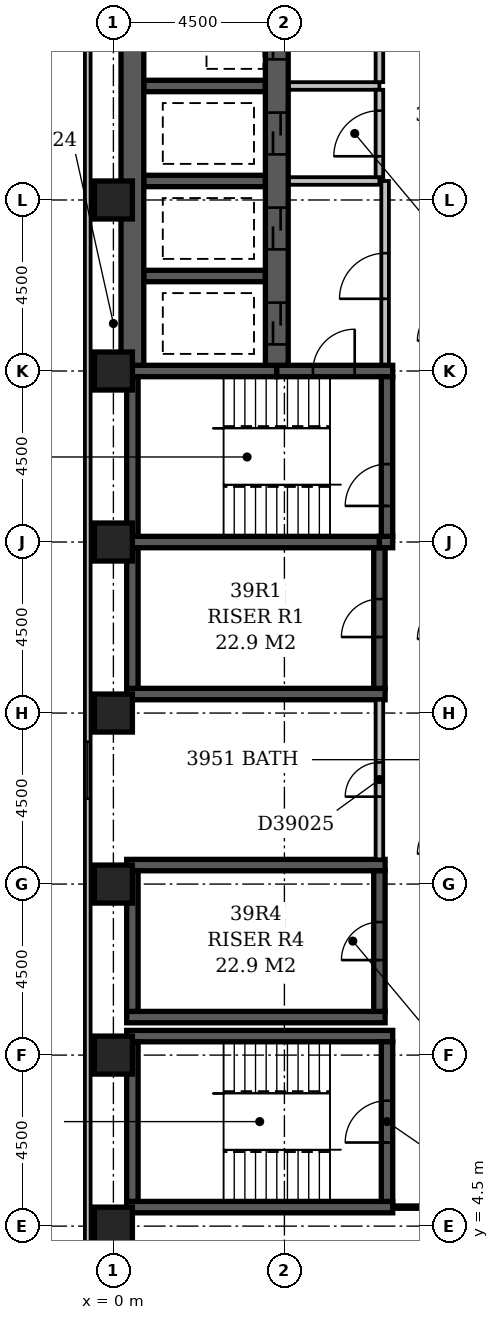
"""IFC4 building model, lengths in metres.
Left out: names, types, materials, properties, quantities, classifications, styles, units other than length and angle.
Written with IfcOpenShell. Run it as: python <this file> out.ifc"""

import sys

from ifc_helpers import new_model, si_unit, direction, frame, frame_2d, origin, origin_2d, place, context, subcontext, project, spatial, rectangle, extrude, element, fill, save


model = new_model("IFC4")
c1 = context("Model", 3, precision=1e-05, world=origin(), true_north=direction((0.0, 1.0)))
c2 = subcontext(c1, "Body", "Model", "MODEL_VIEW")
j1 = project(units=[si_unit("LENGTHUNIT", "METRE"), si_unit("PLANEANGLEUNIT", "RADIAN")], contexts=[c1])
p1 = place(None, origin())
s1 = spatial("IfcSite", under=j1, at=p1, CompositionType="ELEMENT")
p2 = place(p1, origin())
s2 = spatial("IfcBuilding", under=s1, at=p2, CompositionType="ELEMENT")
p3 = place(p2, frame((0.0, 0.0, 155.6)))
s3 = spatial("IfcBuildingStorey", under=s2, at=p3, CompositionType="ELEMENT", Elevation=155.6)
for number, where, z_axis, x_axis in (
    (1, (0.35, 5.0, -0.3), (0.0, 0.0, 1.0), (1.0, 0.0, 0.0)),
    (2, (0.35, 9.5, -0.3), (0.0, 0.0, 1.0), (1.0, 0.0, 0.0)),
):
    element("IfcWall", number, at=place(p3, frame(where, z_axis=z_axis, x_axis=x_axis)), inside=s3, PredefinedType="SHEAR", context=c2, shape_type="SweptSolid", body=[
        extrude(rectangle(XDim=7.0, YDim=0.3, at=frame_2d((3.5, 0.0))), origin(), (0.0, 0.0, 1.0), 3.6),
    ])
for number, where, z_axis, x_axis in (
    (3, (0.35, 10.0, -0.3), (0.0, 0.0, 1.0), (1.0, 0.0, 0.0)),
    (4, (0.35, 14.0, -0.3), (0.0, 0.0, 1.0), (1.0, 0.0, 0.0)),
    (5, (0.35, 18.5, -0.3), (0.0, 0.0, 1.0), (1.0, 0.0, 0.0)),
):
    element("IfcWall", number, at=place(p3, frame(where, z_axis=z_axis, x_axis=x_axis)), inside=s3, PredefinedType="SHEAR", context=c2, shape_type="SweptSolid", body=[
        extrude(rectangle(XDim=6.8, YDim=0.3, at=frame_2d((3.4, 0.0))), origin(), (0.0, 0.0, 1.0), 3.6),
    ])
p4 = place(p3, frame((0.35, 22.5, -0.3), z_axis=(0.0, 0.0, 1.0), x_axis=(1.0, 0.0, 0.0)))
e6 = element("IfcWall", 6, at=p4, inside=s3, PredefinedType="SHEAR", context=c2, shape_type="SweptSolid", body=[
    extrude(rectangle(XDim=6.65, YDim=0.3, at=frame_2d((3.325, 0.0))), origin(), (0.0, 0.0, 1.0), 3.6),
])
p5 = place(p3, frame((0.35, 27.0, -0.3), z_axis=(0.0, 0.0, 1.0), x_axis=(1.0, 0.0, 0.0)))
e7 = element("IfcWall", 7, at=p5, inside=s3, PredefinedType="SHEAR", context=c2, shape_type="SweptSolid", body=[
    extrude(rectangle(XDim=3.95, YDim=0.3, at=frame_2d((1.975, 0.0))), origin(), (0.0, 0.0, 1.0), 3.6),
])
p6 = place(p3, frame((0.5, 5.15, -0.3), z_axis=(0.0, 0.0, 1.0), x_axis=(0.0, 1.0, 0.0)))
e8 = element("IfcWall", 8, at=p6, inside=s3, PredefinedType="SHEAR", context=c2, shape_type="SweptSolid", body=[
    extrude(rectangle(XDim=4.2, YDim=0.3, at=frame_2d((2.1, 0.0))), origin(), (0.0, 0.0, 1.0), 3.6),
])
for number, where, z_axis, x_axis in (
    (9, (0.5, 10.15, -0.3), (0.0, 0.0, 1.0), (0.0, 1.0, 0.0)),
    (10, (0.5, 18.65, -0.3), (0.0, 0.0, 1.0), (0.0, 1.0, 0.0)),
):
    element("IfcWall", number, at=place(p3, frame(where, z_axis=z_axis, x_axis=x_axis)), inside=s3, PredefinedType="SHEAR", context=c2, shape_type="SweptSolid", body=[
        extrude(rectangle(XDim=3.7, YDim=0.3, at=frame_2d((1.85, 0.0))), origin(), (0.0, 0.0, 1.0), 3.6),
    ])
p7 = place(p3, frame((0.5, 22.65, -0.3), z_axis=(0.0, 0.0, 1.0), x_axis=(0.0, 1.0, 0.0)))
e11 = element("IfcWall", 11, at=p7, inside=s3, PredefinedType="SHEAR", context=c2, shape_type="SweptSolid", body=[
    extrude(rectangle(XDim=4.2, YDim=0.3, at=frame_2d((2.1, 0.0))), origin(), (0.0, 0.0, 1.0), 3.6),
])
p8 = place(p3, frame((0.5, 27.15, -0.3), z_axis=(0.0, 0.0, 1.0), x_axis=(0.0, 1.0, 0.0)))
e12 = element("IfcWall", 12, at=p8, inside=s3, PredefinedType="SHEAR", context=c2, shape_type="SweptSolid", body=[
    extrude(rectangle(XDim=22.05, YDim=0.6, at=frame_2d((11.025, 0.0))), origin(), (0.0, 0.0, 1.0), 3.6),
])
for number, where, z_axis, x_axis in (
    (13, (0.8, 29.5, -0.3), (0.0, 0.0, 1.0), (1.0, 0.0, 0.0)),
    (14, (0.8, 32.0, -0.3), (0.0, 0.0, 1.0), (1.0, 0.0, 0.0)),
    (15, (0.8, 34.5, -0.3), (0.0, 0.0, 1.0), (1.0, 0.0, 0.0)),
):
    element("IfcWall", number, at=place(p3, frame(where, z_axis=z_axis, x_axis=x_axis)), inside=s3, PredefinedType="SHEAR", context=c2, shape_type="SweptSolid", body=[
        extrude(rectangle(XDim=3.2, YDim=0.3, at=frame_2d((1.6, 0.0))), origin(), (0.0, 0.0, 1.0), 3.6),
    ])
p9 = place(p3, frame((4.3, 27.0, -0.3), z_axis=(0.0, 0.0, 1.0), x_axis=(1.0, 0.0, 0.0)))
e16 = element("IfcWall", 16, at=p9, inside=s3, PredefinedType="SHEAR", context=c2, shape_type="SweptSolid", body=[
    extrude(rectangle(XDim=3.05, YDim=0.3, at=frame_2d((1.525, 0.0))), origin(), (0.0, 0.0, 1.0), 3.6),
])
p10 = place(p9, frame((0.95, 0.0, 0.3)))
e17 = element("IfcOpeningElement", 17, at=p10, cuts=e16, PredefinedType="OPENING", context=c2, shape_type="SweptSolid", body=[
    extrude(rectangle(XDim=1.1, YDim=2.1, at=frame_2d((0.55, 1.05))), frame((0.0, 0.162, 0.0), z_axis=(0.0, -1.0, 0.0), x_axis=(1.0, 0.0, 0.0)), (0.0, 0.0, 1.0), 0.324),
])
p11 = place(p3, frame((4.3, 27.15, -0.3), z_axis=(0.0, 0.0, 1.0), x_axis=(0.0, 1.0, 0.0)))
e18 = element("IfcWall", 18, at=p11, inside=s3, PredefinedType="SHEAR", context=c2, shape_type="SweptSolid", body=[
    extrude(rectangle(XDim=22.05, YDim=0.6, at=frame_2d((11.025, 0.0))), origin(), (0.0, 0.0, 1.0), 3.6),
])
p12 = place(p11, frame((3.05, 0.0, 0.3)))
e19 = element("IfcOpeningElement", 19, at=p12, cuts=e18, PredefinedType="OPENING", context=c2, shape_type="SweptSolid", body=[
    extrude(rectangle(XDim=1.1, YDim=2.1, at=frame_2d((0.55, 1.05))), frame((0.0, 0.312, 0.0), z_axis=(0.0, -1.0, 0.0), x_axis=(1.0, 0.0, 0.0)), (0.0, 0.0, 1.0), 0.624),
])
p13 = place(p11, frame((0.55, 0.0, 0.3)))
e20 = element("IfcOpeningElement", 20, at=p13, cuts=e18, PredefinedType="OPENING", context=c2, shape_type="SweptSolid", body=[
    extrude(rectangle(XDim=1.1, YDim=2.1, at=frame_2d((0.55, 1.05))), frame((0.0, 0.312, 0.0), z_axis=(0.0, -1.0, 0.0), x_axis=(1.0, 0.0, 0.0)), (0.0, 0.0, 1.0), 0.624),
])
p14 = place(p11, frame((20.55, 0.0, 0.3)))
e21 = element("IfcOpeningElement", 21, at=p14, cuts=e18, PredefinedType="OPENING", context=c2, shape_type="SweptSolid", body=[
    extrude(rectangle(XDim=1.1, YDim=2.1, at=frame_2d((0.55, 1.05))), frame((0.0, 0.312, 0.0), z_axis=(0.0, -1.0, 0.0), x_axis=(1.0, 0.0, 0.0)), (0.0, 0.0, 1.0), 0.624),
])
p15 = place(p11, frame((18.05, 0.0, 0.3)))
e22 = element("IfcOpeningElement", 22, at=p15, cuts=e18, PredefinedType="OPENING", context=c2, shape_type="SweptSolid", body=[
    extrude(rectangle(XDim=1.1, YDim=2.1, at=frame_2d((0.55, 1.05))), frame((0.0, 0.312, 0.0), z_axis=(0.0, -1.0, 0.0), x_axis=(1.0, 0.0, 0.0)), (0.0, 0.0, 1.0), 0.624),
])
p16 = place(p11, frame((15.55, 0.0, 0.3)))
e23 = element("IfcOpeningElement", 23, at=p16, cuts=e18, PredefinedType="OPENING", context=c2, shape_type="SweptSolid", body=[
    extrude(rectangle(XDim=1.1, YDim=2.1, at=frame_2d((0.55, 1.05))), frame((0.0, 0.312, 0.0), z_axis=(0.0, -1.0, 0.0), x_axis=(1.0, 0.0, 0.0)), (0.0, 0.0, 1.0), 0.624),
])
p17 = place(p11, frame((13.05, 0.0, 0.3)))
e24 = element("IfcOpeningElement", 24, at=p17, cuts=e18, PredefinedType="OPENING", context=c2, shape_type="SweptSolid", body=[
    extrude(rectangle(XDim=1.1, YDim=2.1, at=frame_2d((0.55, 1.05))), frame((0.0, 0.312, 0.0), z_axis=(0.0, -1.0, 0.0), x_axis=(1.0, 0.0, 0.0)), (0.0, 0.0, 1.0), 0.624),
])
p18 = place(p11, frame((10.55, 0.0, 0.3)))
e25 = element("IfcOpeningElement", 25, at=p18, cuts=e18, PredefinedType="OPENING", context=c2, shape_type="SweptSolid", body=[
    extrude(rectangle(XDim=1.1, YDim=2.1, at=frame_2d((0.55, 1.05))), frame((0.0, 0.312, 0.0), z_axis=(0.0, -1.0, 0.0), x_axis=(1.0, 0.0, 0.0)), (0.0, 0.0, 1.0), 0.624),
])
p19 = place(p11, frame((8.05, 0.0, 0.3)))
e26 = element("IfcOpeningElement", 26, at=p19, cuts=e18, PredefinedType="OPENING", context=c2, shape_type="SweptSolid", body=[
    extrude(rectangle(XDim=1.1, YDim=2.1, at=frame_2d((0.55, 1.05))), frame((0.0, 0.312, 0.0), z_axis=(0.0, -1.0, 0.0), x_axis=(1.0, 0.0, 0.0)), (0.0, 0.0, 1.0), 0.624),
])
p20 = place(p11, frame((5.55, 0.0, 0.3)))
e27 = element("IfcOpeningElement", 27, at=p20, cuts=e18, PredefinedType="OPENING", context=c2, shape_type="SweptSolid", body=[
    extrude(rectangle(XDim=1.1, YDim=2.1, at=frame_2d((0.55, 1.05))), frame((0.0, 0.312, 0.0), z_axis=(0.0, -1.0, 0.0), x_axis=(1.0, 0.0, 0.0)), (0.0, 0.0, 1.0), 0.624),
])
p21 = place(p3, frame((7.0, 10.15, -0.3), z_axis=(0.0, 0.0, 1.0), x_axis=(0.0, 1.0, 0.0)))
e28 = element("IfcWall", 28, at=p21, inside=s3, PredefinedType="SHEAR", context=c2, shape_type="SweptSolid", body=[
    extrude(rectangle(XDim=3.7, YDim=0.3, at=frame_2d((1.85, 0.0))), origin(), (0.0, 0.0, 1.0), 3.6),
])
p22 = place(p21, frame((1.35, 0.0, 0.3)))
e29 = element("IfcOpeningElement", 29, at=p22, cuts=e28, PredefinedType="OPENING", context=c2, shape_type="SweptSolid", body=[
    extrude(rectangle(XDim=1.0, YDim=2.1, at=frame_2d((0.5, 1.05))), frame((0.0, 0.162, 0.0), z_axis=(0.0, -1.0, 0.0), x_axis=(1.0, 0.0, 0.0)), (0.0, 0.0, 1.0), 0.324),
])
p23 = place(p3, frame((7.0, 18.65, -0.3), z_axis=(0.0, 0.0, 1.0), x_axis=(0.0, 1.0, 0.0)))
e30 = element("IfcWall", 30, at=p23, inside=s3, PredefinedType="SHEAR", context=c2, shape_type="SweptSolid", body=[
    extrude(rectangle(XDim=3.7, YDim=0.3, at=frame_2d((1.85, 0.0))), origin(), (0.0, 0.0, 1.0), 3.6),
])
p24 = place(p23, frame((1.35, 0.0, 0.3)))
e31 = element("IfcOpeningElement", 31, at=p24, cuts=e30, PredefinedType="OPENING", context=c2, shape_type="SweptSolid", body=[
    extrude(rectangle(XDim=1.0, YDim=2.1, at=frame_2d((0.5, 1.05))), frame((0.0, 0.162, 0.0), z_axis=(0.0, -1.0, 0.0), x_axis=(1.0, 0.0, 0.0)), (0.0, 0.0, 1.0), 0.324),
])
p25 = place(p3, frame((7.0, 22.5, -0.3), z_axis=(0.0, 0.0, 1.0), x_axis=(1.0, 0.0, 0.0)))
e32 = element("IfcWall", 32, at=p25, inside=s3, PredefinedType="SHEAR", context=c2, shape_type="SweptSolid", body=[
    extrude(rectangle(XDim=0.35, YDim=0.3, at=frame_2d((0.175, 0.0))), origin(), (0.0, 0.0, 1.0), 3.6),
])
p26 = place(p3, frame((7.2, 5.15, -0.3), z_axis=(0.0, 0.0, 1.0), x_axis=(0.0, 1.0, 0.0)))
e33 = element("IfcWall", 33, at=p26, inside=s3, PredefinedType="SHEAR", context=c2, shape_type="SweptSolid", body=[
    extrude(rectangle(XDim=4.2, YDim=0.3, at=frame_2d((2.1, 0.0))), origin(), (0.0, 0.0, 1.0), 3.6),
])
p27 = place(p26, frame((1.55, 0.0, 0.3)))
e34 = element("IfcOpeningElement", 34, at=p27, cuts=e33, PredefinedType="OPENING", context=c2, shape_type="SweptSolid", body=[
    extrude(rectangle(XDim=1.1, YDim=2.1, at=frame_2d((0.55, 1.05))), frame((0.0, 0.162, 0.0), z_axis=(0.0, -1.0, 0.0), x_axis=(1.0, 0.0, 0.0)), (0.0, 0.0, 1.0), 0.324),
])
p28 = place(p3, frame((7.2, 22.65, -0.3), z_axis=(0.0, 0.0, 1.0), x_axis=(0.0, 1.0, 0.0)))
e35 = element("IfcWall", 35, at=p28, inside=s3, PredefinedType="SHEAR", context=c2, shape_type="SweptSolid", body=[
    extrude(rectangle(XDim=4.2, YDim=0.3, at=frame_2d((2.1, 0.0))), origin(), (0.0, 0.0, 1.0), 3.6),
])
p29 = place(p28, frame((0.8, 0.0, 0.3)))
e36 = element("IfcOpeningElement", 36, at=p29, cuts=e35, PredefinedType="OPENING", context=c2, shape_type="SweptSolid", body=[
    extrude(rectangle(XDim=1.1, YDim=2.1, at=frame_2d((0.55, 1.05))), frame((0.0, 0.162, 0.0), z_axis=(0.0, -1.0, 0.0), x_axis=(1.0, 0.0, 0.0)), (0.0, 0.0, 1.0), 0.324),
])
for number, where, z_axis, x_axis in (
    (37, (0.0, 4.5, -0.3), (0.0, 0.0, 1.0), (1.0, 0.0, 0.0)),
    (38, (0.0, 9.0, -0.3), (0.0, 0.0, 1.0), (1.0, 0.0, 0.0)),
    (39, (0.0, 13.5, -0.3), (0.0, 0.0, 1.0), (1.0, 0.0, 0.0)),
    (40, (0.0, 18.0, -0.3), (0.0, 0.0, 1.0), (1.0, 0.0, 0.0)),
    (41, (0.0, 22.5, -0.3), (0.0, 0.0, 1.0), (1.0, 0.0, 0.0)),
    (42, (0.0, 27.0, -0.3), (0.0, 0.0, 1.0), (1.0, 0.0, 0.0)),
    (43, (0.0, 31.5, -0.3), (0.0, 0.0, 1.0), (1.0, 0.0, 0.0)),
):
    element("IfcColumn", number, at=place(p3, frame(where, z_axis=z_axis, x_axis=x_axis)), inside=s3, PredefinedType="COLUMN", context=c2, shape_type="SweptSolid", body=[
        extrude(rectangle(XDim=1.0, YDim=1.0, at=origin_2d()), origin(), (0.0, 0.0, 1.0), 3.6),
    ])
p30 = place(p3, frame((-0.675, 59.1, 0.0), z_axis=(0.0, 0.0, 1.0), x_axis=(0.0, -1.0, 0.0)))
e44 = element("IfcWall", 44, at=p30, inside=s3, PredefinedType="STANDARD", context=c2, shape_type="SweptSolid", body=[
    extrude(rectangle(XDim=55.35, YDim=0.15, at=frame_2d((27.675, 0.0))), origin(), (0.0, 0.0, 1.0), 2.7),
])
p31 = place(p30, frame((41.854, 0.0, 0.6)))
e45 = element("IfcOpeningElement", 45, at=p31, cuts=e44, PredefinedType="OPENING", context=c2, shape_type="SweptSolid", body=[
    extrude(rectangle(XDim=1.5, YDim=1.8, at=frame_2d((0.75, 0.9))), frame((0.0, 0.087, 0.0), z_axis=(0.0, -1.0, 0.0), x_axis=(1.0, 0.0, 0.0)), (0.0, 0.0, 1.0), 0.174),
])
p32 = place(p3, frame((4.62, 34.5, 0.0), z_axis=(0.0, 0.0, 1.0), x_axis=(1.0, 0.0, 0.0)))
e46 = element("IfcWall", 46, at=p32, inside=s3, PredefinedType="PARTITIONING", context=c2, shape_type="SweptSolid", body=[
    extrude(rectangle(XDim=2.38, YDim=0.2, at=frame_2d((1.19, 0.0))), origin(), (0.0, 0.0, 1.0), 3.3),
])
p33 = place(p3, frame((7.0, 34.6, 0.0), z_axis=(0.0, 0.0, 1.0), x_axis=(0.0, 1.0, 0.0)))
e47 = element("IfcWall", 47, at=p33, inside=s3, PredefinedType="PARTITIONING", context=c2, shape_type="SweptSolid", body=[
    extrude(rectangle(XDim=14.9, YDim=0.2, at=frame_2d((7.45, 0.0))), origin(), (0.0, 0.0, 1.0), 3.3),
])
p34 = place(p33, frame((2.8, 0.0, 0.0)))
e48 = element("IfcOpeningElement", 48, at=p34, cuts=e47, PredefinedType="OPENING", context=c2, shape_type="SweptSolid", body=[
    extrude(rectangle(XDim=1.2, YDim=2.1, at=frame_2d((0.6, 1.05))), frame((0.0, 0.112, 0.0), z_axis=(0.0, -1.0, 0.0), x_axis=(1.0, 0.0, 0.0)), (0.0, 0.0, 1.0), 0.224),
])
p35 = place(p33, frame((9.8, 0.0, 0.0)))
e49 = element("IfcOpeningElement", 49, at=p35, cuts=e47, PredefinedType="OPENING", context=c2, shape_type="SweptSolid", body=[
    extrude(rectangle(XDim=1.2, YDim=2.1, at=frame_2d((0.6, 1.05))), frame((0.0, 0.112, 0.0), z_axis=(0.0, -1.0, 0.0), x_axis=(1.0, 0.0, 0.0)), (0.0, 0.0, 1.0), 0.224),
])
p36 = place(p3, frame((4.62, 32.0, 0.0), z_axis=(0.0, 0.0, 1.0), x_axis=(1.0, 0.0, 0.0)))
e50 = element("IfcWall", 50, at=p36, inside=s3, PredefinedType="PARTITIONING", context=c2, shape_type="SweptSolid", body=[
    extrude(rectangle(XDim=2.38, YDim=0.2, at=frame_2d((1.19, 0.0))), origin(), (0.0, 0.0, 1.0), 3.3),
])
p37 = place(p3, frame((7.0, 32.1, 0.0), z_axis=(0.0, 0.0, 1.0), x_axis=(0.0, 1.0, 0.0)))
e51 = element("IfcWall", 51, at=p37, inside=s3, PredefinedType="PARTITIONING", context=c2, shape_type="SweptSolid", body=[
    extrude(rectangle(XDim=2.3, YDim=0.2, at=frame_2d((1.15, 0.0))), origin(), (0.0, 0.0, 1.0), 3.3),
])
p38 = place(p37, frame((0.55, 0.0, 0.0)))
e52 = element("IfcOpeningElement", 52, at=p38, cuts=e51, PredefinedType="OPENING", context=c2, shape_type="SweptSolid", body=[
    extrude(rectangle(XDim=1.2, YDim=2.1, at=frame_2d((0.6, 1.05))), frame((0.0, 0.112, 0.0), z_axis=(0.0, -1.0, 0.0), x_axis=(1.0, 0.0, 0.0)), (0.0, 0.0, 1.0), 0.224),
])
p39 = place(p3, frame((7.15, 27.17, 0.0), z_axis=(0.0, 0.0, 1.0), x_axis=(0.0, 1.0, 0.0)))
e53 = element("IfcWall", 53, at=p39, inside=s3, PredefinedType="PARTITIONING", context=c2, shape_type="SweptSolid", body=[
    extrude(rectangle(XDim=4.83, YDim=0.2, at=frame_2d((2.415, 0.0))), origin(), (0.0, 0.0, 1.0), 3.3),
])
p40 = place(p39, frame((1.73, 0.0, 0.0)))
e54 = element("IfcOpeningElement", 54, at=p40, cuts=e53, PredefinedType="OPENING", context=c2, shape_type="SweptSolid", body=[
    extrude(rectangle(XDim=1.2, YDim=2.1, at=frame_2d((0.6, 1.05))), frame((0.0, 0.112, 0.0), z_axis=(0.0, -1.0, 0.0), x_axis=(1.0, 0.0, 0.0)), (0.0, 0.0, 1.0), 0.224),
])
p41 = place(p3, frame((0.0, 4.5, 0.0), z_axis=(0.0, 0.0, 1.0), x_axis=(0.0, 1.0, 0.0)))
e55 = element("IfcWall", 55, at=p41, inside=s3, PredefinedType="PARTITIONING", context=c2, shape_type="SweptSolid", body=[
    extrude(rectangle(XDim=0.5, YDim=0.1, at=frame_2d((0.25, 0.0))), origin(), (0.0, 0.0, 1.0), 2.7),
])
p42 = place(p3, frame((7.349, 5.0, 0.0), z_axis=(0.0, 0.0, 1.0), x_axis=(1.0, 0.0, 0.0)))
e56 = element("IfcWall", 56, at=p42, inside=s3, PredefinedType="PARTITIONING", context=c2, shape_type="SweptSolid", body=[
    extrude(rectangle(XDim=1.551, YDim=0.1, at=frame_2d((0.775, 0.0))), origin(), (0.0, 0.0, 1.0), 3.3),
])
p43 = place(p3, frame((7.0, 14.15, 0.0), z_axis=(0.0, 0.0, 1.0), x_axis=(0.0, 1.0, 0.0)))
e57 = element("IfcWall", 57, at=p43, inside=s3, PredefinedType="PARTITIONING", context=c2, shape_type="SweptSolid", body=[
    extrude(rectangle(XDim=4.2, YDim=0.2, at=frame_2d((2.1, 0.0))), origin(), (0.0, 0.0, 1.0), 3.3),
])
p44 = place(p43, frame((1.65, 0.0, 0.0)))
e58 = element("IfcOpeningElement", 58, at=p44, cuts=e57, PredefinedType="OPENING", context=c2, shape_type="SweptSolid", body=[
    extrude(rectangle(XDim=0.9, YDim=2.1, at=frame_2d((0.45, 1.05))), frame((0.0, 0.112, 0.0), z_axis=(0.0, -1.0, 0.0), x_axis=(1.0, 0.0, 0.0)), (0.0, 0.0, 1.0), 0.224),
])
p45 = place(p31, origin())
e59 = element("IfcWindow", 59, at=p45, inside=s3, PartitioningType="SINGLE_PANEL", PredefinedType="WINDOW", context=c2, shape_type="SweptSolid", body=[
    extrude(rectangle(XDim=1.5, YDim=1.8, at=frame_2d((0.75, 0.9))), frame((0.0, 0.03, 0.0), z_axis=(0.0, -1.0, 0.0), x_axis=(1.0, 0.0, 0.0)), (0.0, 0.0, 1.0), 0.06),
])
fill(e45, e59)
p46 = place(p40, origin())
e60 = element("IfcDoor", 60, at=p46, inside=s3, OperationType="SINGLE_SWING_LEFT", PredefinedType="DOOR", context=c2, shape_type="SweptSolid", body=[
    extrude(rectangle(XDim=1.2, YDim=2.1, at=frame_2d((0.6, 1.05))), frame((0.0, 0.025, 0.0), z_axis=(0.0, -1.0, 0.0), x_axis=(1.0, 0.0, 0.0)), (0.0, 0.0, 1.0), 0.05),
])
fill(e54, e60)
p47 = place(p12, origin())
e61 = element("IfcDoor", 61, at=p47, inside=s3, OperationType="SLIDING_TO_LEFT", PredefinedType="DOOR", context=c2, shape_type="SweptSolid", body=[
    extrude(rectangle(XDim=1.1, YDim=2.1, at=frame_2d((0.55, 1.05))), frame((0.0, 0.025, 0.0), z_axis=(0.0, -1.0, 0.0), x_axis=(1.0, 0.0, 0.0)), (0.0, 0.0, 1.0), 0.05),
])
fill(e19, e61)
p48 = place(p13, origin())
e62 = element("IfcDoor", 62, at=p48, inside=s3, OperationType="SLIDING_TO_LEFT", PredefinedType="DOOR", context=c2, shape_type="SweptSolid", body=[
    extrude(rectangle(XDim=1.1, YDim=2.1, at=frame_2d((0.55, 1.05))), frame((0.0, 0.025, 0.0), z_axis=(0.0, -1.0, 0.0), x_axis=(1.0, 0.0, 0.0)), (0.0, 0.0, 1.0), 0.05),
])
fill(e20, e62)
p49 = place(p19, origin())
e63 = element("IfcDoor", 63, at=p49, inside=s3, OperationType="SLIDING_TO_LEFT", PredefinedType="DOOR", context=c2, shape_type="SweptSolid", body=[
    extrude(rectangle(XDim=1.1, YDim=2.1, at=frame_2d((0.55, 1.05))), frame((0.0, 0.025, 0.0), z_axis=(0.0, -1.0, 0.0), x_axis=(1.0, 0.0, 0.0)), (0.0, 0.0, 1.0), 0.05),
])
fill(e26, e63)
p50 = place(p38, origin())
e64 = element("IfcDoor", 64, at=p50, inside=s3, OperationType="SINGLE_SWING_LEFT", PredefinedType="DOOR", context=c2, shape_type="SweptSolid", body=[
    extrude(rectangle(XDim=1.2, YDim=2.1, at=frame_2d((0.6, 1.05))), frame((0.0, 0.025, 0.0), z_axis=(0.0, -1.0, 0.0), x_axis=(1.0, 0.0, 0.0)), (0.0, 0.0, 1.0), 0.05),
])
fill(e52, e64)
p51 = place(p20, origin())
e65 = element("IfcDoor", 65, at=p51, inside=s3, OperationType="SLIDING_TO_LEFT", PredefinedType="DOOR", context=c2, shape_type="SweptSolid", body=[
    extrude(rectangle(XDim=1.1, YDim=2.1, at=frame_2d((0.55, 1.05))), frame((0.0, 0.025, 0.0), z_axis=(0.0, -1.0, 0.0), x_axis=(1.0, 0.0, 0.0)), (0.0, 0.0, 1.0), 0.05),
])
fill(e27, e65)
p52 = place(p24, origin())
e66 = element("IfcDoor", 66, at=p52, inside=s3, OperationType="SINGLE_SWING_LEFT", PredefinedType="DOOR", context=c2, shape_type="SweptSolid", body=[
    extrude(rectangle(XDim=1.0, YDim=2.1, at=frame_2d((0.5, 1.05))), frame((0.0, 0.025, 0.0), z_axis=(0.0, -1.0, 0.0), x_axis=(1.0, 0.0, 0.0)), (0.0, 0.0, 1.0), 0.05),
])
fill(e31, e66)
p53 = place(p22, origin())
e67 = element("IfcDoor", 67, at=p53, inside=s3, OperationType="SINGLE_SWING_LEFT", PredefinedType="DOOR", context=c2, shape_type="SweptSolid", body=[
    extrude(rectangle(XDim=1.0, YDim=2.1, at=frame_2d((0.5, 1.05))), frame((0.0, 0.025, 0.0), z_axis=(0.0, -1.0, 0.0), x_axis=(1.0, 0.0, 0.0)), (0.0, 0.0, 1.0), 0.05),
])
fill(e29, e67)
p54 = place(p10, frame((1.1, 0.0, 0.0), z_axis=(0.0, 0.0, 1.0), x_axis=(-1.0, 0.0, 0.0)))
e68 = element("IfcDoor", 68, at=p54, inside=s3, OperationType="SINGLE_SWING_LEFT", PredefinedType="DOOR", context=c2, shape_type="SweptSolid", body=[
    extrude(rectangle(XDim=1.1, YDim=2.1, at=frame_2d((0.55, 1.05))), frame((0.0, 0.025, 0.0), z_axis=(0.0, -1.0, 0.0), x_axis=(1.0, 0.0, 0.0)), (0.0, 0.0, 1.0), 0.05),
])
fill(e17, e68)
p55 = place(p29, origin())
e69 = element("IfcDoor", 69, at=p55, inside=s3, OperationType="SINGLE_SWING_LEFT", PredefinedType="DOOR", context=c2, shape_type="SweptSolid", body=[
    extrude(rectangle(XDim=1.1, YDim=2.1, at=frame_2d((0.55, 1.05))), frame((0.0, 0.025, 0.0), z_axis=(0.0, -1.0, 0.0), x_axis=(1.0, 0.0, 0.0)), (0.0, 0.0, 1.0), 0.05),
])
fill(e36, e69)
p56 = place(p27, origin())
e70 = element("IfcDoor", 70, at=p56, inside=s3, OperationType="SINGLE_SWING_LEFT", PredefinedType="DOOR", context=c2, shape_type="SweptSolid", body=[
    extrude(rectangle(XDim=1.1, YDim=2.1, at=frame_2d((0.55, 1.05))), frame((0.0, 0.025, 0.0), z_axis=(0.0, -1.0, 0.0), x_axis=(1.0, 0.0, 0.0)), (0.0, 0.0, 1.0), 0.05),
])
fill(e34, e70)
p57 = place(p44, origin())
e71 = element("IfcDoor", 71, at=p57, inside=s3, OperationType="SINGLE_SWING_LEFT", PredefinedType="DOOR", context=c2, shape_type="SweptSolid", body=[
    extrude(rectangle(XDim=0.9, YDim=2.1, at=frame_2d((0.45, 1.05))), frame((0.0, 0.025, 0.0), z_axis=(0.0, -1.0, 0.0), x_axis=(1.0, 0.0, 0.0)), (0.0, 0.0, 1.0), 0.05),
])
fill(e58, e71)
save(model, sys.argv[1])
